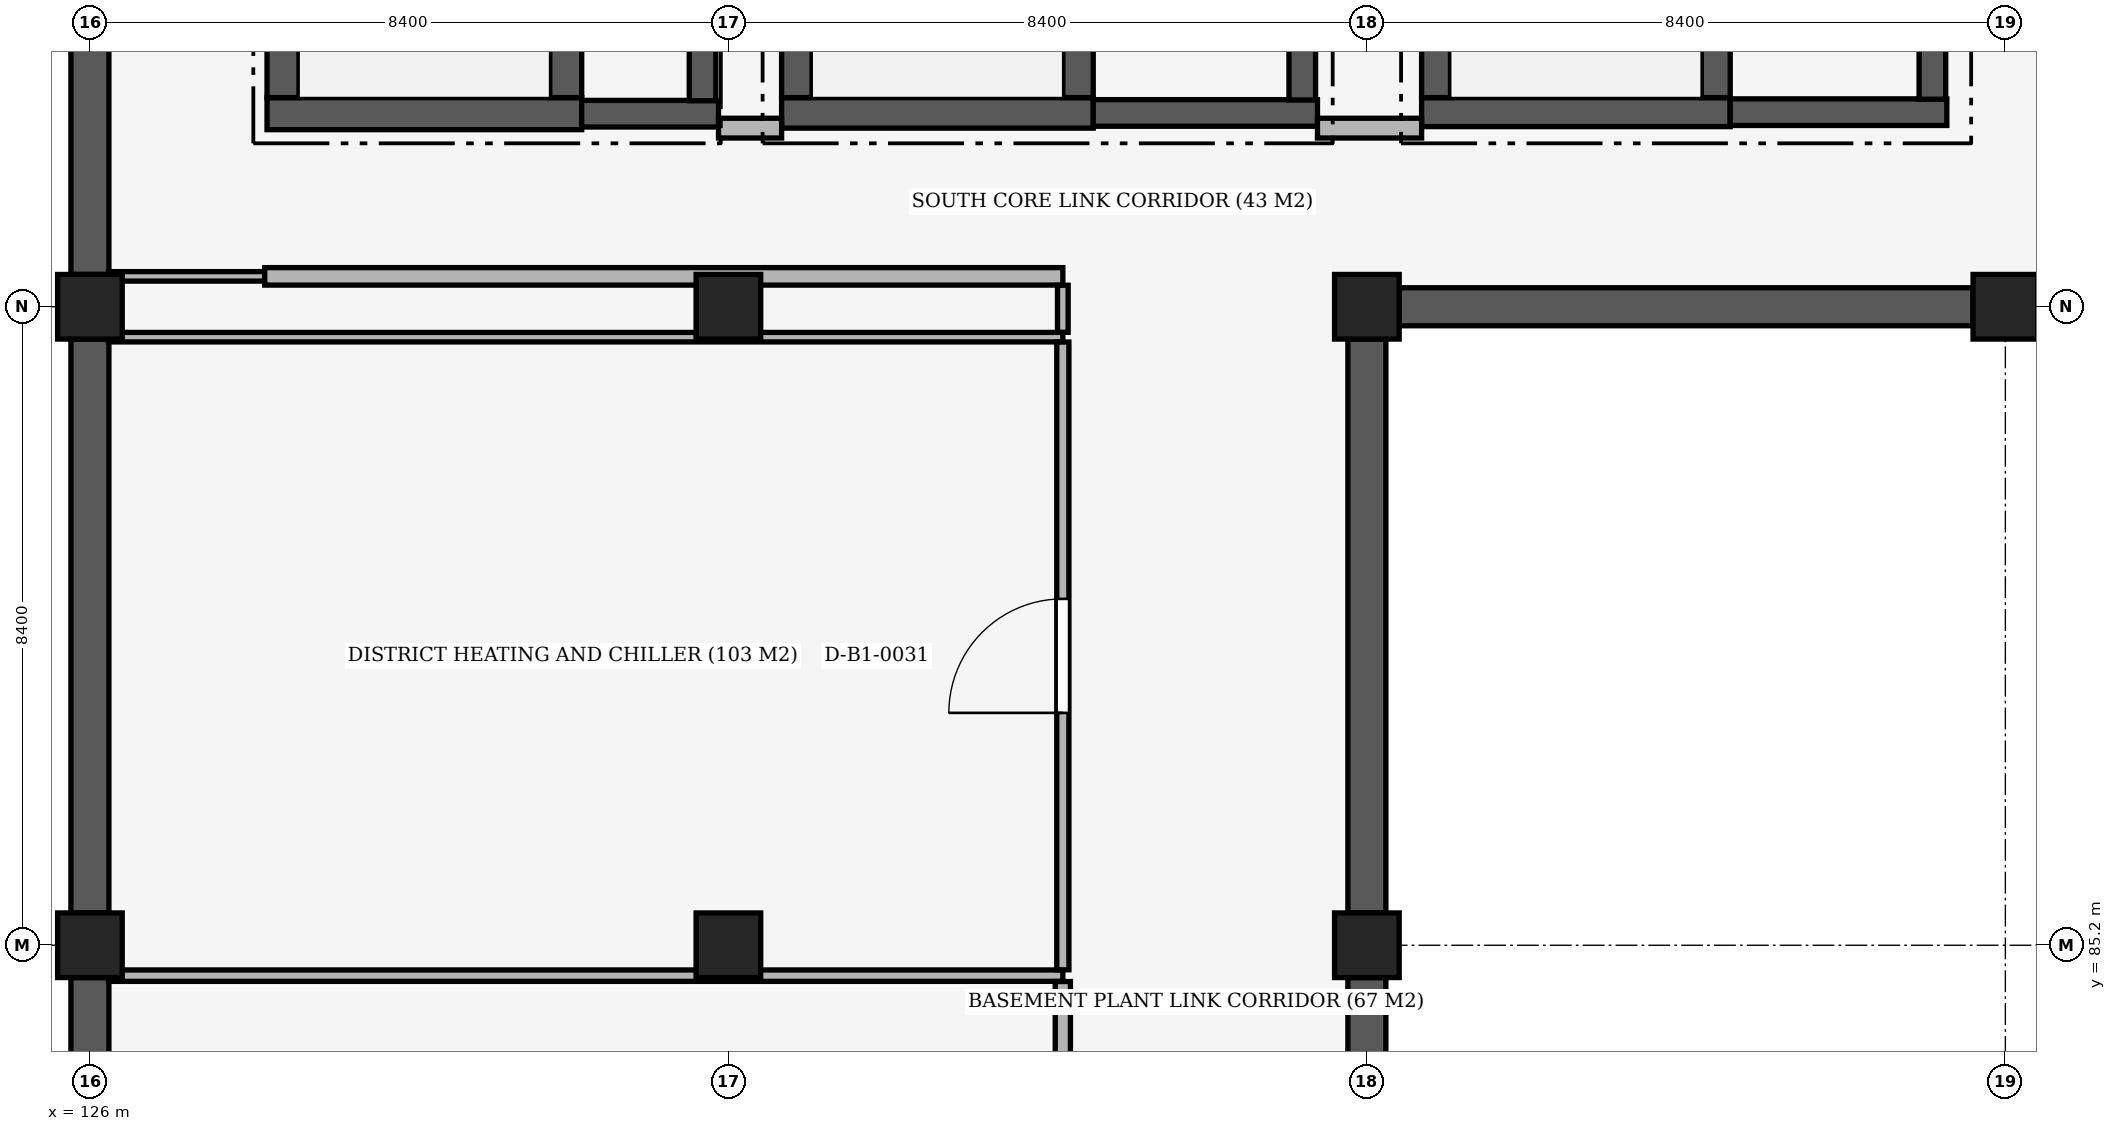
"""IFC4 building model, lengths in metres.
Left out: names, types, materials, properties, quantities, classifications, styles, units other than length and angle.
Written with IfcOpenShell. Run it as: python <this file> out.ifc"""

import sys

from ifc_helpers import new_model, si_unit, direction, frame, frame_2d, origin, origin_2d, place, context, subcontext, project, spatial, rectangle, extrude, element, fill, save


model = new_model("IFC4")
c1 = context("Model", 3, precision=1e-05, world=origin(), true_north=direction((0.0, 1.0)))
c2 = subcontext(c1, "Body", "Model", "MODEL_VIEW")
j1 = project(units=[si_unit("LENGTHUNIT", "METRE"), si_unit("PLANEANGLEUNIT", "RADIAN")], contexts=[c1])
p1 = place(None, origin())
s1 = spatial("IfcSite", under=j1, at=p1, CompositionType="ELEMENT")
p2 = place(p1, origin())
s2 = spatial("IfcBuilding", under=s1, at=p2, CompositionType="ELEMENT")
p3 = place(p2, frame((0.0, 0.0, -4.8)))
s3 = spatial("IfcBuildingStorey", under=s2, at=p3, CompositionType="ELEMENT", Elevation=-4.8)
for number, where, z_axis, x_axis in (
    (1, (126.0, 85.2, 0.0), (0.0, 0.0, 1.0), (1.0, 0.0, 0.0)),
    (2, (126.0, 93.6, 0.0), (0.0, 0.0, 1.0), (1.0, 0.0, 0.0)),
    (3, (134.4, 85.2, 0.0), (0.0, 0.0, 1.0), (1.0, 0.0, 0.0)),
    (4, (134.4, 93.6, 0.0), (0.0, 0.0, 1.0), (1.0, 0.0, 0.0)),
    (5, (142.8, 85.2, 0.0), (0.0, 0.0, 1.0), (1.0, 0.0, 0.0)),
    (6, (142.8, 93.6, 0.0), (0.0, 0.0, 1.0), (1.0, 0.0, 0.0)),
    (7, (151.2, 93.6, 0.0), (0.0, 0.0, 1.0), (1.0, 0.0, 0.0)),
):
    element("IfcColumn", number, at=place(p3, frame(where, z_axis=z_axis, x_axis=x_axis)), inside=s3, PredefinedType="COLUMN", context=c2, shape_type="SweptSolid", body=[
        extrude(rectangle(XDim=0.85, YDim=0.85, at=origin_2d()), origin(), (0.0, 0.0, 1.0), 4.8),
    ])
p4 = place(p3, frame((126.0, 80.225, 0.0), z_axis=(0.0, 0.0, 1.0), x_axis=(0.0, 1.0, 0.0)))
e8 = element("IfcWall", 8, at=p4, inside=s3, PredefinedType="USERDEFINED", context=c2, shape_type="SweptSolid", body=[
    extrude(rectangle(XDim=4.55, YDim=0.5, at=frame_2d((2.275, 0.0))), origin(), (0.0, 0.0, 1.0), 3.85),
])
p5 = place(p3, frame((126.0, 85.625, 0.0), z_axis=(0.0, 0.0, 1.0), x_axis=(0.0, 1.0, 0.0)))
e9 = element("IfcWall", 9, at=p5, inside=s3, PredefinedType="USERDEFINED", context=c2, shape_type="SweptSolid", body=[
    extrude(rectangle(XDim=7.55, YDim=0.5, at=frame_2d((3.775, 0.0))), origin(), (0.0, 0.0, 1.0), 3.7),
])
p6 = place(p3, frame((126.0, 94.025, 0.0), z_axis=(0.0, 0.0, 1.0), x_axis=(0.0, 1.0, 0.0)))
e10 = element("IfcWall", 10, at=p6, inside=s3, PredefinedType="USERDEFINED", context=c2, shape_type="SweptSolid", body=[
    extrude(rectangle(XDim=5.25, YDim=0.5, at=frame_2d((2.625, 0.0))), origin(), (0.0, 0.0, 1.0), 3.85),
])
p7 = place(p3, frame((150.775, 93.6, 0.0), z_axis=(0.0, 0.0, 1.0), x_axis=(-1.0, 0.0, 0.0)))
e11 = element("IfcWall", 11, at=p7, inside=s3, PredefinedType="USERDEFINED", context=c2, shape_type="SweptSolid", body=[
    extrude(rectangle(XDim=7.55, YDim=0.5, at=frame_2d((3.775, 0.0))), origin(), (0.0, 0.0, 1.0), 3.8),
])
p8 = place(p3, frame((142.8, 93.175, 0.0), z_axis=(0.0, 0.0, 1.0), x_axis=(0.0, -1.0, 0.0)))
e12 = element("IfcWall", 12, at=p8, inside=s3, PredefinedType="USERDEFINED", context=c2, shape_type="SweptSolid", body=[
    extrude(rectangle(XDim=7.55, YDim=0.5, at=frame_2d((3.775, 0.0))), origin(), (0.0, 0.0, 1.0), 3.7),
])
p9 = place(p3, frame((142.8, 84.775, 0.0), z_axis=(0.0, 0.0, 1.0), x_axis=(0.0, -1.0, 0.0)))
e13 = element("IfcWall", 13, at=p9, inside=s3, PredefinedType="USERDEFINED", context=c2, shape_type="SweptSolid", body=[
    extrude(rectangle(XDim=4.55, YDim=0.5, at=frame_2d((2.275, 0.0))), origin(), (0.0, 0.0, 1.0), 3.85),
])
p10 = place(p3, frame((128.33, 96.14, 0.0), z_axis=(0.0, 0.0, 1.0), x_axis=(1.0, 0.0, 0.0)))
e14 = element("IfcWall", 14, at=p10, inside=s3, PredefinedType="SHEAR", context=c2, shape_type="SweptSolid", body=[
    extrude(rectangle(XDim=4.14, YDim=0.42, at=frame_2d((2.07, 0.0))), origin(), (0.0, 0.0, 1.0), 4.5),
])
for number, where, z_axis, x_axis in (
    (15, (128.54, 96.352, 0.0), (0.0, 0.0, 1.0), (0.0, 1.0, 0.0)),
    (16, (132.26, 96.352, 0.0), (0.0, 0.0, 1.0), (0.0, 1.0, 0.0)),
):
    element("IfcWall", number, at=place(p3, frame(where, z_axis=z_axis, x_axis=x_axis)), inside=s3, PredefinedType="SHEAR", context=c2, shape_type="SweptSolid", body=[
        extrude(rectangle(XDim=6.896, YDim=0.42, at=frame_2d((3.448, 0.0))), origin(), (0.0, 0.0, 1.0), 4.5),
    ])
p11 = place(p3, frame((132.47, 96.14, 0.0), z_axis=(0.0, 0.0, 1.0), x_axis=(1.0, 0.0, 0.0)))
e17 = element("IfcWall", 17, at=p11, inside=s3, PredefinedType="SHEAR", context=c2, shape_type="SweptSolid", body=[
    extrude(rectangle(XDim=1.8, YDim=0.35, at=frame_2d((0.9, 0.0))), origin(), (0.0, 0.0, 1.0), 4.5),
])
p12 = place(p3, frame((134.06, 96.31, 0.0), z_axis=(0.0, 0.0, 1.0), x_axis=(0.0, 1.0, 0.0)))
e18 = element("IfcWall", 18, at=p12, inside=s3, PredefinedType="SHEAR", context=c2, shape_type="SweptSolid", body=[
    extrude(rectangle(XDim=7.197, YDim=0.35, at=frame_2d((3.599, 0.0))), origin(), (0.0, 0.0, 1.0), 4.5),
])
p13 = place(p3, frame((135.1, 96.15, 0.0), z_axis=(0.0, 0.0, 1.0), x_axis=(1.0, 0.0, 0.0)))
e19 = element("IfcWall", 19, at=p13, inside=s3, PredefinedType="SHEAR", context=c2, shape_type="SweptSolid", body=[
    extrude(rectangle(XDim=4.1, YDim=0.4, at=frame_2d((2.05, 0.0))), origin(), (0.0, 0.0, 1.0), 4.5),
])
for number, where, z_axis, x_axis in (
    (20, (135.3, 96.352, 0.0), (0.0, 0.0, 1.0), (0.0, 1.0, 0.0)),
    (21, (139.0, 96.352, 0.0), (0.0, 0.0, 1.0), (0.0, 1.0, 0.0)),
):
    element("IfcWall", number, at=place(p3, frame(where, z_axis=z_axis, x_axis=x_axis)), inside=s3, PredefinedType="SHEAR", context=c2, shape_type="SweptSolid", body=[
        extrude(rectangle(XDim=6.896, YDim=0.4, at=frame_2d((3.448, 0.0))), origin(), (0.0, 0.0, 1.0), 4.5),
    ])
p14 = place(p3, frame((139.2, 96.15, 0.0), z_axis=(0.0, 0.0, 1.0), x_axis=(1.0, 0.0, 0.0)))
e22 = element("IfcWall", 22, at=p14, inside=s3, PredefinedType="SHEAR", context=c2, shape_type="SweptSolid", body=[
    extrude(rectangle(XDim=2.95, YDim=0.35, at=frame_2d((1.475, 0.0))), origin(), (0.0, 0.0, 1.0), 4.5),
])
p15 = place(p3, frame((141.95, 96.32, 0.0), z_axis=(0.0, 0.0, 1.0), x_axis=(0.0, 1.0, 0.0)))
e23 = element("IfcWall", 23, at=p15, inside=s3, PredefinedType="SHEAR", context=c2, shape_type="SweptSolid", body=[
    extrude(rectangle(XDim=7.187, YDim=0.35, at=frame_2d((3.594, 0.0))), origin(), (0.0, 0.0, 1.0), 4.5),
])
p16 = place(p3, frame((143.52, 96.16, 0.0), z_axis=(0.0, 0.0, 1.0), x_axis=(1.0, 0.0, 0.0)))
e24 = element("IfcWall", 24, at=p16, inside=s3, PredefinedType="SHEAR", context=c2, shape_type="SweptSolid", body=[
    extrude(rectangle(XDim=4.06, YDim=0.38, at=frame_2d((2.03, 0.0))), origin(), (0.0, 0.0, 1.0), 4.5),
])
for number, where, z_axis, x_axis in (
    (25, (143.71, 96.352, 0.0), (0.0, 0.0, 1.0), (0.0, 1.0, 0.0)),
    (26, (147.39, 96.352, 0.0), (0.0, 0.0, 1.0), (0.0, 1.0, 0.0)),
):
    element("IfcWall", number, at=place(p3, frame(where, z_axis=z_axis, x_axis=x_axis)), inside=s3, PredefinedType="SHEAR", context=c2, shape_type="SweptSolid", body=[
        extrude(rectangle(XDim=6.896, YDim=0.38, at=frame_2d((3.448, 0.0))), origin(), (0.0, 0.0, 1.0), 4.5),
    ])
p17 = place(p3, frame((147.58, 96.16, 0.0), z_axis=(0.0, 0.0, 1.0), x_axis=(1.0, 0.0, 0.0)))
e27 = element("IfcWall", 27, at=p17, inside=s3, PredefinedType="SHEAR", context=c2, shape_type="SweptSolid", body=[
    extrude(rectangle(XDim=2.85, YDim=0.35, at=frame_2d((1.425, 0.0))), origin(), (0.0, 0.0, 1.0), 4.5),
])
p18 = place(p3, frame((150.24, 96.33, 0.0), z_axis=(0.0, 0.0, 1.0), x_axis=(0.0, 1.0, 0.0)))
e28 = element("IfcWall", 28, at=p18, inside=s3, PredefinedType="SHEAR", context=c2, shape_type="SweptSolid", body=[
    extrude(rectangle(XDim=7.177, YDim=0.35, at=frame_2d((3.588, 0.0))), origin(), (0.0, 0.0, 1.0), 4.5),
])
p19 = place(p3, frame((126.244, 84.8, 0.0), z_axis=(0.0, 0.0, 1.0), x_axis=(1.0, 0.0, 0.0)))
e29 = element("IfcWall", 29, at=p19, inside=s3, PredefinedType="PARTITIONING", context=c2, shape_type="SweptSolid", body=[
    extrude(rectangle(XDim=12.556, YDim=0.15, at=frame_2d((6.278, 0.0))), origin(), (0.0, 0.0, 1.0), 3.75),
])
p20 = place(p3, frame((126.244, 93.2, 0.0), z_axis=(0.0, 0.0, 1.0), x_axis=(1.0, 0.0, 0.0)))
e30 = element("IfcWall", 30, at=p20, inside=s3, PredefinedType="PARTITIONING", context=c2, shape_type="SweptSolid", body=[
    extrude(rectangle(XDim=12.556, YDim=0.125, at=frame_2d((6.278, 0.0))), origin(), (0.0, 0.0, 1.0), 3.7),
])
p21 = place(p3, frame((126.244, 94.0, 0.0), z_axis=(0.0, 0.0, 1.0), x_axis=(1.0, 0.0, 0.0)))
e31 = element("IfcWall", 31, at=p21, inside=s3, PredefinedType="PARTITIONING", context=c2, shape_type="SweptSolid", body=[
    extrude(rectangle(XDim=2.056, YDim=0.125, at=frame_2d((1.028, 0.0))), origin(), (0.0, 0.0, 1.0), 4.5),
])
p22 = place(p3, frame((128.3, 94.0, 0.0), z_axis=(0.0, 0.0, 1.0), x_axis=(1.0, 0.0, 0.0)))
e32 = element("IfcWall", 32, at=p22, inside=s3, PredefinedType="SOLIDWALL", context=c2, shape_type="SweptSolid", body=[
    extrude(rectangle(XDim=10.5, YDim=0.23, at=frame_2d((5.25, 0.0))), origin(), (0.0, 0.0, 1.0), 3.85),
])
p23 = place(p3, frame((134.27, 95.95, 0.0), z_axis=(0.0, 0.0, 1.0), x_axis=(1.0, 0.0, 0.0)))
e33 = element("IfcWall", 33, at=p23, inside=s3, PredefinedType="PARTITIONING", context=c2, shape_type="SweptSolid", body=[
    extrude(rectangle(XDim=0.83, YDim=0.26, at=frame_2d((0.415, 0.0))), origin(), (0.0, 0.0, 1.0), 3.85),
])
p24 = place(p3, frame((142.15, 95.95, 0.0), z_axis=(0.0, 0.0, 1.0), x_axis=(1.0, 0.0, 0.0)))
e34 = element("IfcWall", 34, at=p24, inside=s3, PredefinedType="PARTITIONING", context=c2, shape_type="SweptSolid", body=[
    extrude(rectangle(XDim=1.37, YDim=0.26, at=frame_2d((0.685, 0.0))), origin(), (0.0, 0.0, 1.0), 3.85),
])
p25 = place(p3, frame((138.8, 74.972, 0.0), z_axis=(0.0, 0.0, 1.0), x_axis=(0.0, 1.0, 0.0)))
e35 = element("IfcWall", 35, at=p25, inside=s3, PredefinedType="PARTITIONING", context=c2, shape_type="SweptSolid", body=[
    extrude(rectangle(XDim=9.751, YDim=0.2, at=frame_2d((4.875, 0.0))), origin(), (0.0, 0.0, 1.0), 3.75),
])
p26 = place(p25, frame((4.126, 0.0, 0.0)))
e36 = element("IfcOpeningElement", 36, at=p26, cuts=e35, PredefinedType="OPENING", context=c2, shape_type="SweptSolid", body=[
    extrude(rectangle(XDim=1.5, YDim=2.2, at=frame_2d((0.75, 1.1))), frame((0.0, 0.115, 0.0), z_axis=(0.0, -1.0, 0.0), x_axis=(1.0, 0.0, 0.0)), (0.0, 0.0, 1.0), 0.23),
])
p27 = place(p3, frame((138.8, 84.877, 0.0), z_axis=(0.0, 0.0, 1.0), x_axis=(0.0, 1.0, 0.0)))
e37 = element("IfcWall", 37, at=p27, inside=s3, PredefinedType="PARTITIONING", context=c2, shape_type="SweptSolid", body=[
    extrude(rectangle(XDim=8.259, YDim=0.16, at=frame_2d((4.129, 0.0))), origin(), (0.0, 0.0, 1.0), 3.75),
])
p28 = place(p27, frame((3.38, 0.0, 0.0)))
e38 = element("IfcOpeningElement", 38, at=p28, cuts=e37, PredefinedType="OPENING", context=c2, shape_type="SweptSolid", body=[
    extrude(rectangle(XDim=1.5, YDim=2.2, at=frame_2d((0.75, 1.1))), frame((0.0, 0.095, 0.0), z_axis=(0.0, -1.0, 0.0), x_axis=(1.0, 0.0, 0.0)), (0.0, 0.0, 1.0), 0.19),
])
p29 = place(p3, frame((138.8, 93.264, 0.0), z_axis=(0.0, 0.0, 1.0), x_axis=(0.0, 1.0, 0.0)))
e39 = element("IfcWall", 39, at=p29, inside=s3, PredefinedType="PARTITIONING", context=c2, shape_type="SweptSolid", body=[
    extrude(rectangle(XDim=0.619, YDim=0.14, at=frame_2d((0.31, 0.0))), origin(), (0.0, 0.0, 1.0), 3.8),
])
p30 = place(p28, origin())
e40 = element("IfcDoor", 40, at=p30, inside=s3, OperationType="SINGLE_SWING_LEFT", PredefinedType="DOOR", context=c2, shape_type="SweptSolid", body=[
    extrude(rectangle(XDim=1.5, YDim=2.2, at=frame_2d((0.75, 1.1))), frame((0.0, 0.025, 0.0), z_axis=(0.0, -1.0, 0.0), x_axis=(1.0, 0.0, 0.0)), (0.0, 0.0, 1.0), 0.05),
])
fill(e38, e40)
save(model, sys.argv[1])
